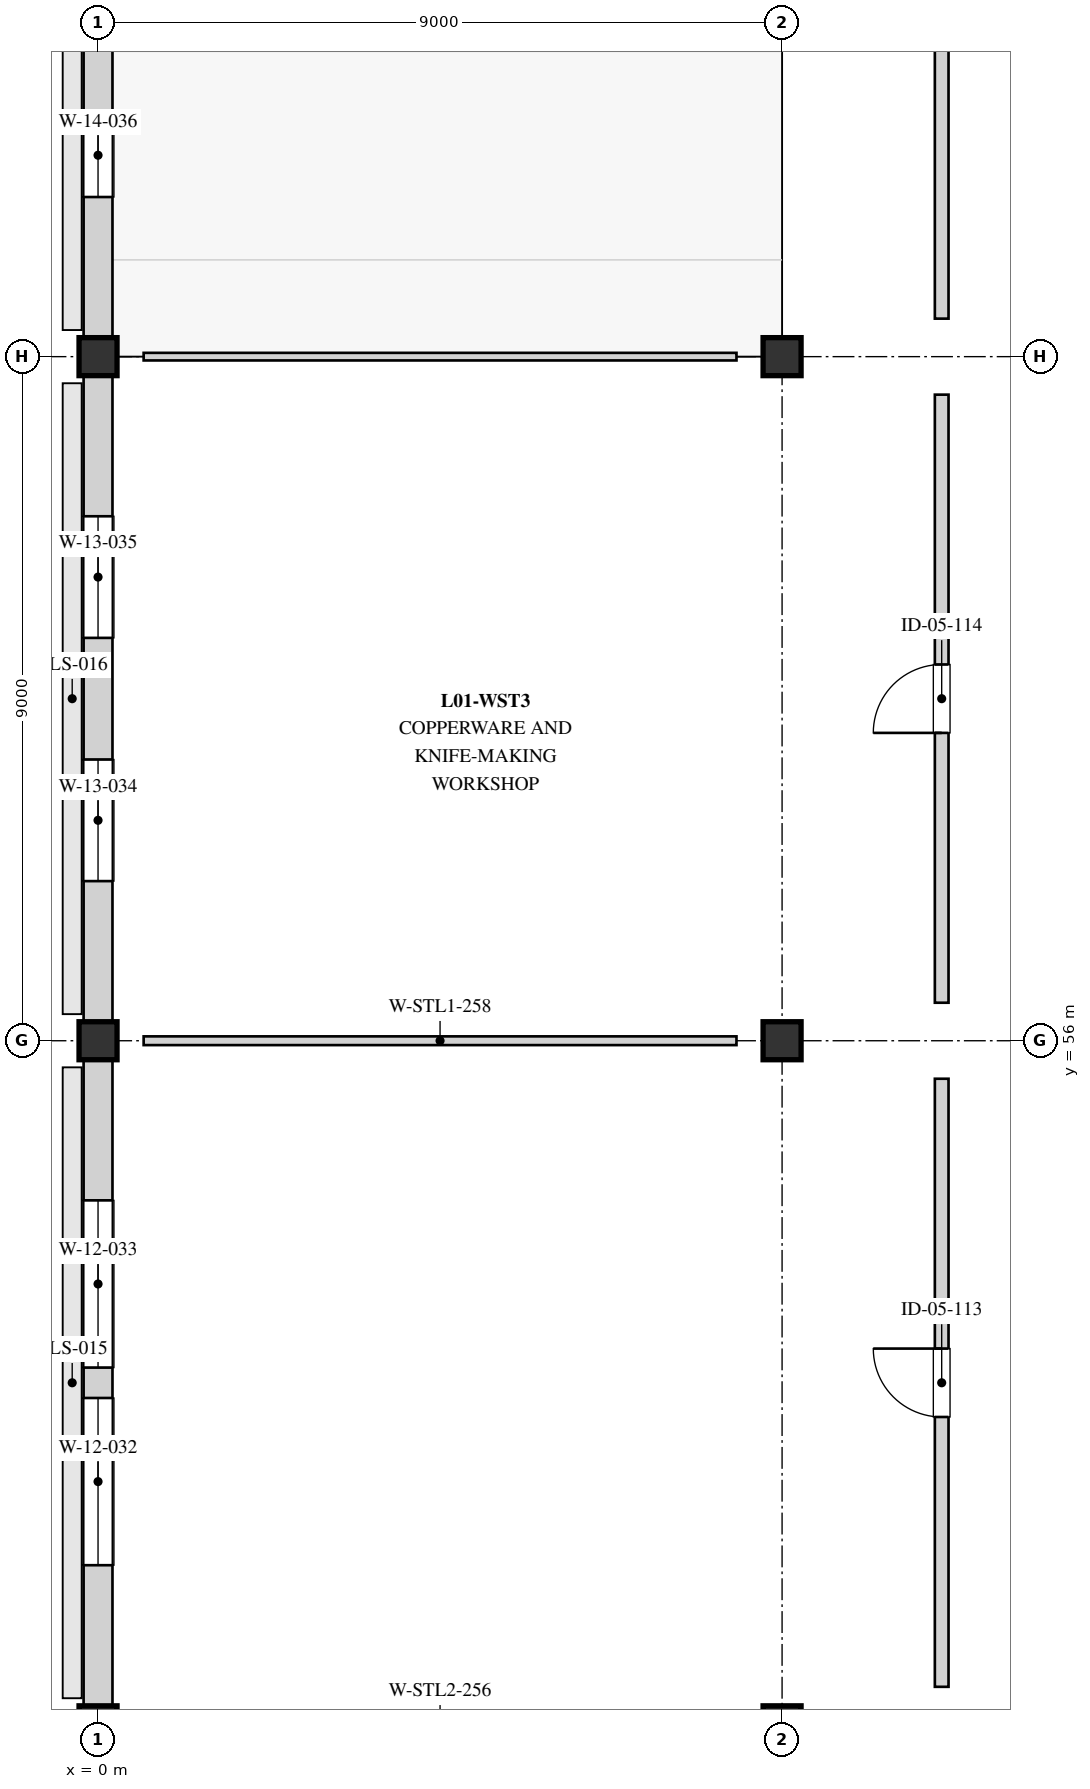
"""IFC4 building model, lengths in metres.
Left out: names, types, materials, properties, quantities, classifications, styles, units other than length and angle.
Written with IfcOpenShell. Run it as: python <this file> out.ifc"""

import sys

from ifc_helpers import new_model, si_unit, direction, frame, frame_2d, origin, origin_2d, place, context, subcontext, project, spatial, rectangle, extrude, element, fill, save


model = new_model("IFC4")
c1 = context("Model", 3, precision=1e-05, world=origin(), true_north=direction((0.0, 1.0)))
c2 = subcontext(c1, "Body", "Model", "MODEL_VIEW")
j1 = project(units=[si_unit("LENGTHUNIT", "METRE"), si_unit("PLANEANGLEUNIT", "RADIAN")], contexts=[c1])
p1 = place(None, origin())
s1 = spatial("IfcSite", under=j1, at=p1, CompositionType="ELEMENT")
p2 = place(p1, origin())
s2 = spatial("IfcBuilding", under=s1, at=p2, CompositionType="ELEMENT")
p3 = place(p2, frame((0.0, 0.0, 4.5)))
s3 = spatial("IfcBuildingStorey", under=s2, at=p3, CompositionType="ELEMENT", Elevation=4.5)
for number, where, z_axis, x_axis in (
    (1, (0.0, 47.0, 0.0), (0.0, 0.0, 1.0), (1.0, 0.0, 0.0)),
    (2, (0.0, 56.0, 0.0), (0.0, 0.0, 1.0), (1.0, 0.0, 0.0)),
):
    element("IfcColumn", number, at=place(p3, frame(where, z_axis=z_axis, x_axis=x_axis)), inside=s3, PredefinedType="COLUMN", context=c2, shape_type="SweptSolid", body=[
        extrude(rectangle(XDim=0.5, YDim=0.5, at=origin_2d()), origin(), (0.0, 0.0, 1.0), 3.48),
    ])
p4 = place(p3, frame((0.0, 65.0, 0.0), z_axis=(0.0, 0.0, 1.0), x_axis=(1.0, 0.0, 0.0)))
e3 = element("IfcColumn", 3, at=p4, inside=s3, PredefinedType="COLUMN", context=c2, shape_type="SweptSolid", body=[
    extrude(rectangle(XDim=0.5, YDim=0.5, at=origin_2d()), origin(), (0.0, 0.0, 1.0), 3.59),
])
for number, where, z_axis, x_axis in (
    (4, (9.0, 47.0, 0.0), (0.0, 0.0, 1.0), (1.0, 0.0, 0.0)),
    (5, (9.0, 56.0, 0.0), (0.0, 0.0, 1.0), (1.0, 0.0, 0.0)),
):
    element("IfcColumn", number, at=place(p3, frame(where, z_axis=z_axis, x_axis=x_axis)), inside=s3, PredefinedType="COLUMN", context=c2, shape_type="SweptSolid", body=[
        extrude(rectangle(XDim=0.5, YDim=0.5, at=origin_2d()), origin(), (0.0, 0.0, 1.0), 3.48),
    ])
p5 = place(p3, frame((9.0, 65.0, 0.0), z_axis=(0.0, 0.0, 1.0), x_axis=(1.0, 0.0, 0.0)))
e6 = element("IfcColumn", 6, at=p5, inside=s3, PredefinedType="COLUMN", context=c2, shape_type="SweptSolid", body=[
    extrude(rectangle(XDim=0.5, YDim=0.5, at=origin_2d()), origin(), (0.0, 0.0, 1.0), 5.59),
])
p6 = place(p3, frame((0.0, 47.0, 0.0), z_axis=(0.0, 0.0, 1.0), x_axis=(0.0, 1.0, 0.0)))
e7 = element("IfcWall", 7, at=p6, inside=s3, PredefinedType="STANDARD", context=c2, shape_type="SweptSolid", body=[
    extrude(rectangle(XDim=9.0, YDim=0.38, at=frame_2d((4.5, 0.0))), origin(), (0.0, 0.0, 1.0), 2.76),
])
p7 = place(p6, frame((2.1, 0.0, 0.47)))
e8 = element("IfcOpeningElement", 8, at=p7, cuts=e7, PredefinedType="OPENING", context=c2, shape_type="SweptSolid", body=[
    extrude(rectangle(XDim=2.2, YDim=2.1, at=frame_2d((1.1, 1.05))), frame((0.0, 0.2, 0.0), z_axis=(0.0, -1.0, 0.0), x_axis=(1.0, 0.0, 0.0)), (0.0, 0.0, 1.0), 0.4),
])
p8 = place(p6, frame((4.7, 0.0, 0.47)))
e9 = element("IfcOpeningElement", 9, at=p8, cuts=e7, PredefinedType="OPENING", context=c2, shape_type="SweptSolid", body=[
    extrude(rectangle(XDim=2.2, YDim=2.1, at=frame_2d((1.1, 1.05))), frame((0.0, 0.2, 0.0), z_axis=(0.0, -1.0, 0.0), x_axis=(1.0, 0.0, 0.0)), (0.0, 0.0, 1.0), 0.4),
])
p9 = place(p3, frame((0.0, 56.0, 0.0), z_axis=(0.0, 0.0, 1.0), x_axis=(0.0, 1.0, 0.0)))
e10 = element("IfcWall", 10, at=p9, inside=s3, PredefinedType="STANDARD", context=c2, shape_type="SweptSolid", body=[
    extrude(rectangle(XDim=9.0, YDim=0.38, at=frame_2d((4.5, 0.0))), origin(), (0.0, 0.0, 1.0), 2.76),
])
p10 = place(p9, frame((2.1, 0.0, 0.47)))
e11 = element("IfcOpeningElement", 11, at=p10, cuts=e10, PredefinedType="OPENING", context=c2, shape_type="SweptSolid", body=[
    extrude(rectangle(XDim=1.6, YDim=2.1, at=frame_2d((0.8, 1.05))), frame((0.0, 0.2, 0.0), z_axis=(0.0, -1.0, 0.0), x_axis=(1.0, 0.0, 0.0)), (0.0, 0.0, 1.0), 0.4),
])
p11 = place(p9, frame((5.3, 0.0, 0.47)))
e12 = element("IfcOpeningElement", 12, at=p11, cuts=e10, PredefinedType="OPENING", context=c2, shape_type="SweptSolid", body=[
    extrude(rectangle(XDim=1.6, YDim=2.1, at=frame_2d((0.8, 1.05))), frame((0.0, 0.2, 0.0), z_axis=(0.0, -1.0, 0.0), x_axis=(1.0, 0.0, 0.0)), (0.0, 0.0, 1.0), 0.4),
])
p12 = place(p3, frame((0.0, 65.0, 0.0), z_axis=(0.0, 0.0, 1.0), x_axis=(0.0, 1.0, 0.0)))
e13 = element("IfcWall", 13, at=p12, inside=s3, PredefinedType="STANDARD", context=c2, shape_type="SweptSolid", body=[
    extrude(rectangle(XDim=9.0, YDim=0.38, at=frame_2d((4.5, 0.0))), origin(), (0.0, 0.0, 1.0), 2.76),
])
p13 = place(p12, frame((2.1, 0.0, 0.48)))
e14 = element("IfcOpeningElement", 14, at=p13, cuts=e13, PredefinedType="OPENING", context=c2, shape_type="SweptSolid", body=[
    extrude(rectangle(XDim=1.1, YDim=2.1, at=frame_2d((0.55, 1.05))), frame((0.0, 0.2, 0.0), z_axis=(0.0, -1.0, 0.0), x_axis=(1.0, 0.0, 0.0)), (0.0, 0.0, 1.0), 0.4),
])
p14 = place(p12, frame((5.8, 0.0, 0.48)))
e15 = element("IfcOpeningElement", 15, at=p14, cuts=e13, PredefinedType="OPENING", context=c2, shape_type="SweptSolid", body=[
    extrude(rectangle(XDim=1.1, YDim=2.1, at=frame_2d((0.55, 1.05))), frame((0.0, 0.2, 0.0), z_axis=(0.0, -1.0, 0.0), x_axis=(1.0, 0.0, 0.0)), (0.0, 0.0, 1.0), 0.4),
])
p15 = place(p3, frame((11.1, 47.5, 0.0), z_axis=(0.0, 0.0, 1.0), x_axis=(0.0, 1.0, 0.0)))
e16 = element("IfcWall", 16, at=p15, inside=s3, PredefinedType="STANDARD", context=c2, shape_type="SweptSolid", body=[
    extrude(rectangle(XDim=8.0, YDim=0.18, at=frame_2d((4.0, 0.0))), origin(), (0.0, 0.0, 1.0), 2.65),
])
p16 = place(p15, frame((3.55, 0.0, 0.0)))
e17 = element("IfcOpeningElement", 17, at=p16, cuts=e16, PredefinedType="OPENING", context=c2, shape_type="SweptSolid", body=[
    extrude(rectangle(XDim=0.9, YDim=2.05, at=frame_2d((0.45, 1.025))), frame((0.0, 0.1, 0.0), z_axis=(0.0, -1.0, 0.0), x_axis=(1.0, 0.0, 0.0)), (0.0, 0.0, 1.0), 0.2),
])
p17 = place(p3, frame((11.1, 56.5, 0.0), z_axis=(0.0, 0.0, 1.0), x_axis=(0.0, 1.0, 0.0)))
e18 = element("IfcWall", 18, at=p17, inside=s3, PredefinedType="STANDARD", context=c2, shape_type="SweptSolid", body=[
    extrude(rectangle(XDim=8.0, YDim=0.18, at=frame_2d((4.0, 0.0))), origin(), (0.0, 0.0, 1.0), 2.65),
])
p18 = place(p17, frame((3.55, 0.0, 0.0)))
e19 = element("IfcOpeningElement", 19, at=p18, cuts=e18, PredefinedType="OPENING", context=c2, shape_type="SweptSolid", body=[
    extrude(rectangle(XDim=0.9, YDim=2.05, at=frame_2d((0.45, 1.025))), frame((0.0, 0.1, 0.0), z_axis=(0.0, -1.0, 0.0), x_axis=(1.0, 0.0, 0.0)), (0.0, 0.0, 1.0), 0.2),
])
p19 = place(p3, frame((11.1, 65.5, 0.0), z_axis=(0.0, 0.0, 1.0), x_axis=(0.0, 1.0, 0.0)))
e20 = element("IfcWall", 20, at=p19, inside=s3, PredefinedType="STANDARD", context=c2, shape_type="SweptSolid", body=[
    extrude(rectangle(XDim=8.0, YDim=0.18, at=frame_2d((4.0, 0.0))), origin(), (0.0, 0.0, 1.0), 2.65),
])
p20 = place(p19, frame((3.55, 0.0, 0.0)))
e21 = element("IfcOpeningElement", 21, at=p20, cuts=e20, PredefinedType="OPENING", context=c2, shape_type="SweptSolid", body=[
    extrude(rectangle(XDim=0.9, YDim=2.05, at=frame_2d((0.45, 1.025))), frame((0.0, 0.1, 0.0), z_axis=(0.0, -1.0, 0.0), x_axis=(1.0, 0.0, 0.0)), (0.0, 0.0, 1.0), 0.2),
])
p21 = place(p3, frame((0.6, 56.0, 0.0), z_axis=(0.0, 0.0, 1.0), x_axis=(1.0, 0.0, 0.0)))
e22 = element("IfcWall", 22, at=p21, inside=s3, PredefinedType="PARTITIONING", context=c2, shape_type="SweptSolid", body=[
    extrude(rectangle(XDim=7.8, YDim=0.115, at=frame_2d((3.9, 0.0))), origin(), (0.0, 0.0, 1.0), 2.4),
])
p22 = place(p3, frame((0.6, 65.0, 0.0), z_axis=(0.0, 0.0, 1.0), x_axis=(1.0, 0.0, 0.0)))
e23 = element("IfcWall", 23, at=p22, inside=s3, PredefinedType="PARTITIONING", context=c2, shape_type="SweptSolid", body=[
    extrude(rectangle(XDim=7.8, YDim=0.1, at=frame_2d((3.9, 0.0))), origin(), (0.0, 0.0, 1.0), 2.4),
])
p23 = place(p7, origin())
e24 = element("IfcWindow", 24, at=p23, inside=s3, PartitioningType="SINGLE_PANEL", PredefinedType="WINDOW", context=c2, shape_type="SweptSolid", body=[
    extrude(rectangle(XDim=2.2, YDim=2.1, at=frame_2d((1.1, 1.05))), frame((0.0, 0.03, 0.0), z_axis=(0.0, -1.0, 0.0), x_axis=(1.0, 0.0, 0.0)), (0.0, 0.0, 1.0), 0.06),
])
fill(e8, e24)
p24 = place(p8, origin())
e25 = element("IfcWindow", 25, at=p24, inside=s3, PartitioningType="SINGLE_PANEL", PredefinedType="WINDOW", context=c2, shape_type="SweptSolid", body=[
    extrude(rectangle(XDim=2.2, YDim=2.1, at=frame_2d((1.1, 1.05))), frame((0.0, 0.03, 0.0), z_axis=(0.0, -1.0, 0.0), x_axis=(1.0, 0.0, 0.0)), (0.0, 0.0, 1.0), 0.06),
])
fill(e9, e25)
p25 = place(p10, origin())
e26 = element("IfcWindow", 26, at=p25, inside=s3, PartitioningType="SINGLE_PANEL", PredefinedType="WINDOW", context=c2, shape_type="SweptSolid", body=[
    extrude(rectangle(XDim=1.6, YDim=2.1, at=frame_2d((0.8, 1.05))), frame((0.0, 0.03, 0.0), z_axis=(0.0, -1.0, 0.0), x_axis=(1.0, 0.0, 0.0)), (0.0, 0.0, 1.0), 0.06),
])
fill(e11, e26)
p26 = place(p11, origin())
e27 = element("IfcWindow", 27, at=p26, inside=s3, PartitioningType="SINGLE_PANEL", PredefinedType="WINDOW", context=c2, shape_type="SweptSolid", body=[
    extrude(rectangle(XDim=1.6, YDim=2.1, at=frame_2d((0.8, 1.05))), frame((0.0, 0.03, 0.0), z_axis=(0.0, -1.0, 0.0), x_axis=(1.0, 0.0, 0.0)), (0.0, 0.0, 1.0), 0.06),
])
fill(e12, e27)
p27 = place(p13, origin())
e28 = element("IfcWindow", 28, at=p27, inside=s3, PartitioningType="SINGLE_PANEL", PredefinedType="WINDOW", context=c2, shape_type="SweptSolid", body=[
    extrude(rectangle(XDim=1.1, YDim=2.1, at=frame_2d((0.55, 1.05))), frame((0.0, 0.03, 0.0), z_axis=(0.0, -1.0, 0.0), x_axis=(1.0, 0.0, 0.0)), (0.0, 0.0, 1.0), 0.06),
])
fill(e14, e28)
p28 = place(p16, origin())
e29 = element("IfcDoor", 29, at=p28, inside=s3, OperationType="SINGLE_SWING_RIGHT", PredefinedType="DOOR", context=c2, shape_type="SweptSolid", body=[
    extrude(rectangle(XDim=0.9, YDim=2.05, at=frame_2d((0.45, 1.025))), frame((0.0, 0.025, 0.0), z_axis=(0.0, -1.0, 0.0), x_axis=(1.0, 0.0, 0.0)), (0.0, 0.0, 1.0), 0.05),
])
fill(e17, e29)
p29 = place(p18, origin())
e30 = element("IfcDoor", 30, at=p29, inside=s3, OperationType="SINGLE_SWING_LEFT", PredefinedType="DOOR", context=c2, shape_type="SweptSolid", body=[
    extrude(rectangle(XDim=0.9, YDim=2.05, at=frame_2d((0.45, 1.025))), frame((0.0, 0.025, 0.0), z_axis=(0.0, -1.0, 0.0), x_axis=(1.0, 0.0, 0.0)), (0.0, 0.0, 1.0), 0.05),
])
fill(e19, e30)
save(model, sys.argv[1])
